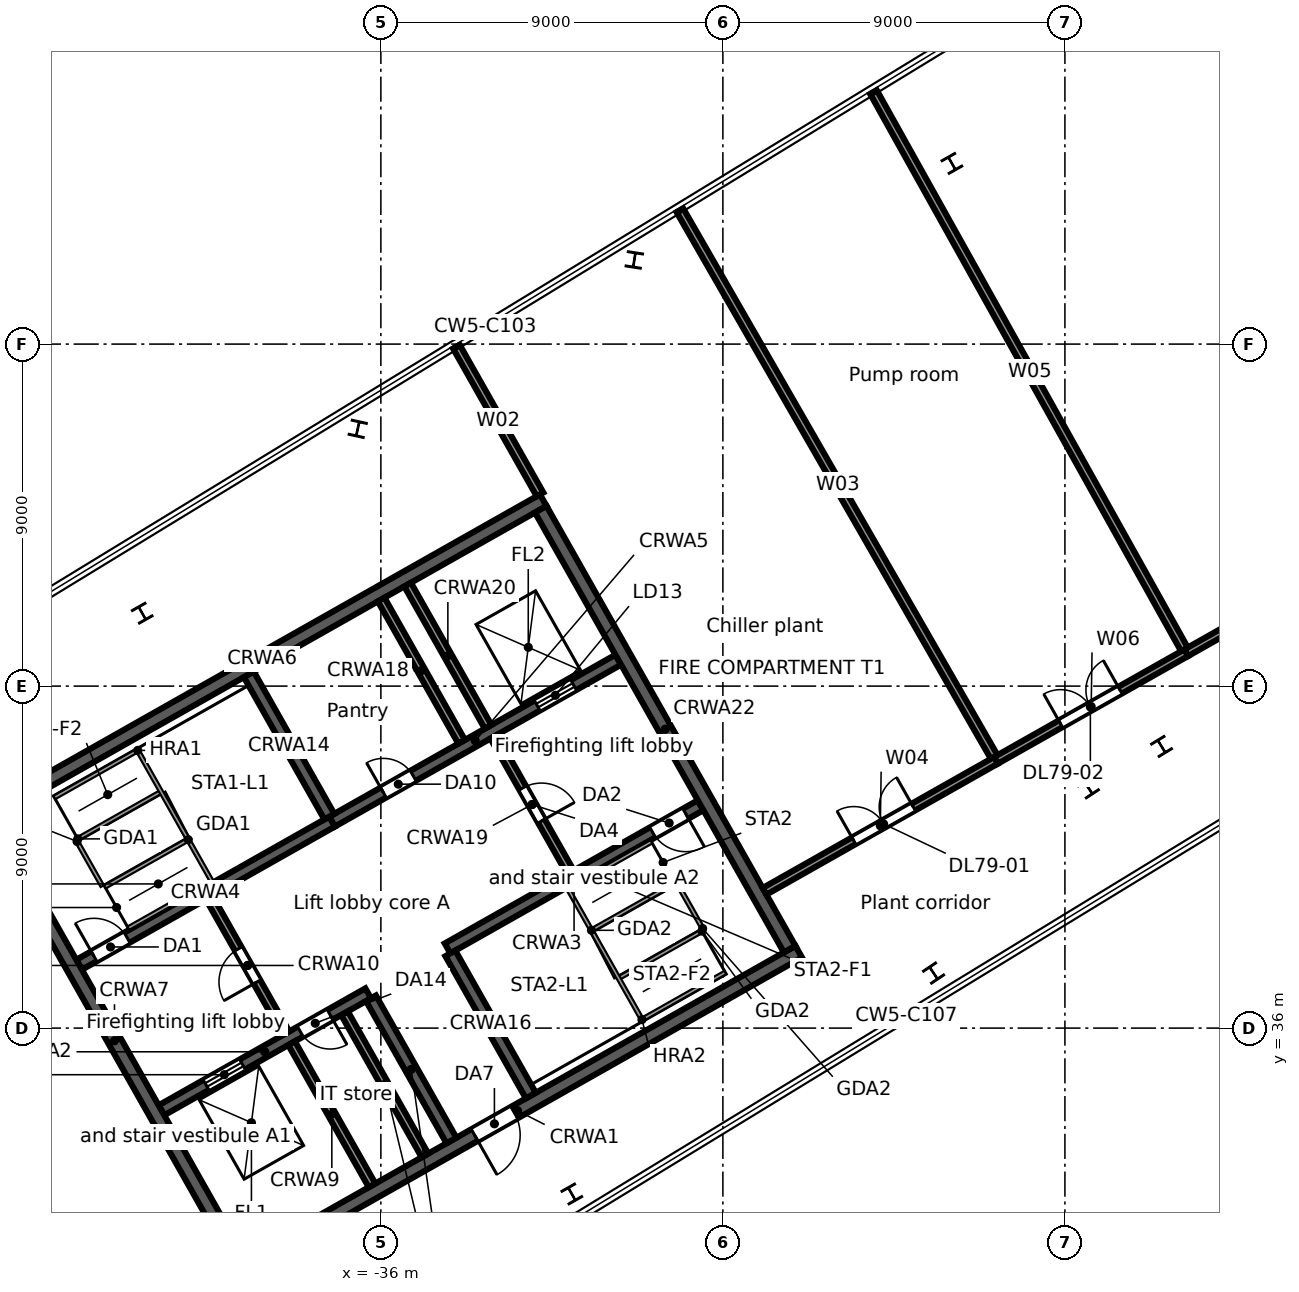
"""IFC4 building model, lengths in metres.
Left out: names, types, materials, properties, quantities, classifications, styles, units other than length and angle.
Written with IfcOpenShell. Run it as: python <this file> out.ifc"""

import sys

from ifc_helpers import new_model, si_unit, direction, frame, frame_2d, origin, origin_2d, place, context, subcontext, project, spatial, rectangle, i_section, extrude, element, fill, save


model = new_model("IFC4")
c1 = context("Model", 3, precision=1e-05, world=origin(), true_north=direction((0.0, 1.0)))
c2 = subcontext(c1, "Body", "Model", "MODEL_VIEW")
j1 = project(units=[si_unit("LENGTHUNIT", "METRE"), si_unit("PLANEANGLEUNIT", "RADIAN")], contexts=[c1])
p1 = place(None, origin())
s1 = spatial("IfcSite", under=j1, at=p1, CompositionType="ELEMENT")
p2 = place(p1, origin())
s2 = spatial("IfcBuilding", under=s1, at=p2, CompositionType="ELEMENT")
p3 = place(p2, frame((0.0, 0.0, 350.5)))
s3 = spatial("IfcBuildingStorey", under=s2, at=p3, CompositionType="ELEMENT", Elevation=350.5)
for number, where, z_axis, x_axis in (
    (1, (-42.28, 46.919, 0.0), (0.0, 0.0, 1.0), (-0.87, -0.492, 0.0)),
    (2, (-30.976, 31.635, 0.0), (0.0, 0.0, 1.0), (0.87, 0.492, 0.0)),
    (3, (-20.974, 58.755, 0.0), (0.0, 0.0, 1.0), (-0.87, -0.492, 0.0)),
    (4, (-29.331, 56.214, 0.0), (0.0, 0.0, 1.0), (-0.988, 0.153, 0.0)),
    (5, (-36.609, 51.77, 0.0), (0.0, 0.0, 1.0), (-0.977, 0.215, 0.0)),
    (6, (-21.456, 37.448, 0.0), (0.0, 0.0, 1.0), (0.83, 0.557, 0.0)),
    (7, (-15.458, 43.413, 0.0), (0.0, 0.0, 1.0), (0.853, 0.521, 0.0)),
):
    element("IfcColumn", number, at=place(p3, frame(where, z_axis=z_axis, x_axis=x_axis)), inside=s3, PredefinedType="COLUMN", context=c2, shape_type="SweptSolid", body=[
        extrude(i_section(OverallWidth=0.4, OverallDepth=0.4, WebThickness=0.013, FlangeThickness=0.021, FilletRadius=0.022, at=origin_2d()), origin(), (0.0, 0.0, 1.0), 3.3),
    ])
p4 = place(p3, frame((-17.382, 42.324, 0.0), z_axis=(0.0, 0.0, 1.0), x_axis=(0.835615665335, 0.549314536351, 0.0)))
e8 = element("IfcColumn", 8, at=p4, inside=s3, PredefinedType="COLUMN", context=c2, shape_type="SweptSolid", body=[
    extrude(i_section(OverallWidth=0.4, OverallDepth=0.4, WebThickness=0.013, FlangeThickness=0.021, FilletRadius=0.022, at=origin_2d()), origin(), (0.0, 0.0, 1.0), 3.6),
])
p5 = place(p3, frame((-44.12, 26.51, 0.0), z_axis=(0.0, 0.0, 1.0), x_axis=(-0.85716996621, 0.515033638734, 0.0)))
e9 = element("IfcWall", 9, at=p5, inside=s3, PredefinedType="STANDARD", context=c2, shape_type="SweptSolid", body=[
    extrude(rectangle(XDim=17.084, YDim=0.2, at=frame_2d((8.542, 0.0))), origin(), (0.0, 0.0, 1.0), 3.3),
])
p6 = place(p3, frame((-39.801, 29.64, 0.0), z_axis=(0.0, 0.0, 1.0), x_axis=(0.870359753402, 0.492416388494, 0.0)))
e10 = element("IfcWall", 10, at=p6, inside=s3, PredefinedType="SOLIDWALL", context=c2, shape_type="SweptSolid", body=[
    extrude(rectangle(XDim=17.0, YDim=0.35, at=frame_2d((8.5, 0.0))), origin(), (0.0, 0.0, 1.0), 3.3),
])
p7 = place(p6, frame((7.2, 0.0, 0.0)))
e11 = element("IfcOpeningElement", 11, at=p7, cuts=e10, PredefinedType="OPENING", context=c2, shape_type="SweptSolid", body=[
    extrude(rectangle(XDim=1.2, YDim=2.1, at=frame_2d((0.6, 1.05))), frame((0.0, 0.185, 0.0), z_axis=(0.0, -1.0, 0.0), x_axis=(1.0, 0.0, 0.0)), (0.0, 0.0, 1.0), 0.37),
])
p8 = place(p3, frame((-41.774, 33.838, 0.0), z_axis=(0.0, 0.0, 1.0), x_axis=(0.870355415866, 0.492424055132, 0.0)))
e12 = element("IfcWall", 12, at=p8, inside=s3, PredefinedType="SOLIDWALL", context=c2, shape_type="SweptSolid", body=[
    extrude(rectangle(XDim=6.25, YDim=0.3, at=frame_2d((3.125, 0.0))), origin(), (0.0, 0.0, 1.0), 3.3),
])
p9 = place(p8, frame((1.35, 0.0, 0.0)))
e13 = element("IfcOpeningElement", 13, at=p9, cuts=e12, PredefinedType="OPENING", context=c2, shape_type="SweptSolid", body=[
    extrude(rectangle(XDim=1.1, YDim=2.1, at=frame_2d((0.55, 1.05))), frame((0.0, 0.16, 0.0), z_axis=(0.0, -1.0, 0.0), x_axis=(1.0, 0.0, 0.0)), (0.0, 0.0, 1.0), 0.32),
])
p10 = place(p8, frame((4.2, 0.0, 0.0)))
e14 = element("IfcOpeningElement", 14, at=p10, cuts=e12, PredefinedType="OPENING", context=c2, shape_type="SweptSolid", body=[
    extrude(rectangle(XDim=0.9, YDim=2.1, at=frame_2d((0.45, 1.05))), frame((0.0, 0.16, 0.0), z_axis=(0.0, -1.0, 0.0), x_axis=(1.0, 0.0, 0.0)), (0.0, 0.0, 1.0), 0.32),
])
p11 = place(p3, frame((-34.245, 38.097, 0.0), z_axis=(0.0, 0.0, 1.0), x_axis=(0.870352347706, 0.49242947804, 0.0)))
e15 = element("IfcWall", 15, at=p11, inside=s3, PredefinedType="SOLIDWALL", context=c2, shape_type="SweptSolid", body=[
    extrude(rectangle(XDim=7.65, YDim=0.3, at=frame_2d((3.825, 0.0))), origin(), (0.0, 0.0, 1.0), 3.3),
])
p12 = place(p11, frame((6.2, 0.0, 0.0)))
e16 = element("IfcOpeningElement", 16, at=p12, cuts=e15, PredefinedType="OPENING", context=c2, shape_type="SweptSolid", body=[
    extrude(rectangle(XDim=1.0, YDim=2.1, at=frame_2d((0.5, 1.05))), frame((0.0, 0.16, 0.0), z_axis=(0.0, -1.0, 0.0), x_axis=(1.0, 0.0, 0.0)), (0.0, 0.0, 1.0), 0.32),
])
p13 = place(p3, frame((-43.94, 37.667, 0.0), z_axis=(0.0, 0.0, 1.0), x_axis=(0.870352347706, 0.49242947804, 0.0)))
e17 = element("IfcWall", 17, at=p13, inside=s3, PredefinedType="SOLIDWALL", context=c2, shape_type="SweptSolid", body=[
    extrude(rectangle(XDim=7.65, YDim=0.3, at=frame_2d((3.825, 0.0))), origin(), (0.0, 0.0, 1.0), 3.3),
])
p14 = place(p13, frame((0.45, 0.0, 0.0)))
e18 = element("IfcOpeningElement", 18, at=p14, cuts=e17, PredefinedType="OPENING", context=c2, shape_type="SweptSolid", body=[
    extrude(rectangle(XDim=1.0, YDim=2.1, at=frame_2d((0.5, 1.05))), frame((0.0, 0.16, 0.0), z_axis=(0.0, -1.0, 0.0), x_axis=(1.0, 0.0, 0.0)), (0.0, 0.0, 1.0), 0.32),
])
p15 = place(p3, frame((-37.282, 41.435, 0.0), z_axis=(0.0, 0.0, 1.0), x_axis=(0.870364588774, 0.492407841741, 0.0)))
e19 = element("IfcWall", 19, at=p15, inside=s3, PredefinedType="SOLIDWALL", context=c2, shape_type="SweptSolid", body=[
    extrude(rectangle(XDim=8.65, YDim=0.3, at=frame_2d((4.325, 0.0))), origin(), (0.0, 0.0, 1.0), 3.3),
])
p16 = place(p15, frame((6.2, 0.0, 0.0)))
e20 = element("IfcOpeningElement", 20, at=p16, cuts=e19, PredefinedType="OPENING", context=c2, shape_type="SweptSolid", body=[
    extrude(rectangle(XDim=1.1, YDim=2.1, at=frame_2d((0.55, 1.05))), frame((0.0, 0.16, 0.0), z_axis=(0.0, -1.0, 0.0), x_axis=(1.0, 0.0, 0.0)), (0.0, 0.0, 1.0), 0.32),
])
p17 = place(p15, frame((1.55, 0.0, 0.0)))
e21 = element("IfcOpeningElement", 21, at=p17, cuts=e19, PredefinedType="OPENING", context=c2, shape_type="SweptSolid", body=[
    extrude(rectangle(XDim=0.9, YDim=2.1, at=frame_2d((0.45, 1.05))), frame((0.0, 0.16, 0.0), z_axis=(0.0, -1.0, 0.0), x_axis=(1.0, 0.0, 0.0)), (0.0, 0.0, 1.0), 0.32),
])
p18 = place(p3, frame((-46.522, 41.521, 0.0), z_axis=(0.0, 0.0, 1.0), x_axis=(0.870359753402, 0.492416388494, 0.0)))
e22 = element("IfcWall", 22, at=p18, inside=s3, PredefinedType="SOLIDWALL", context=c2, shape_type="SweptSolid", body=[
    extrude(rectangle(XDim=17.0, YDim=0.35, at=frame_2d((8.5, 0.0))), origin(), (0.0, 0.0, 1.0), 3.3),
])
p19 = place(p3, frame((-46.284, 41.454, 0.0), z_axis=(0.0, 0.0, 1.0), x_axis=(0.492429810477, -0.870352159619, 0.0)))
e23 = element("IfcWall", 23, at=p19, inside=s3, PredefinedType="SOLIDWALL", context=c2, shape_type="SweptSolid", body=[
    extrude(rectangle(XDim=13.3, YDim=0.35, at=frame_2d((6.65, 0.0))), origin(), (0.0, 0.0, 1.0), 3.3),
])
p20 = place(p3, frame((-38.349, 35.603, 0.0), z_axis=(0.0, 0.0, 1.0), x_axis=(0.492410799949, -0.870362915164, 0.0)))
e24 = element("IfcWall", 24, at=p20, inside=s3, PredefinedType="SOLIDWALL", context=c2, shape_type="SweptSolid", body=[
    extrude(rectangle(XDim=4.3, YDim=0.2, at=frame_2d((2.15, 0.0))), origin(), (0.0, 0.0, 1.0), 3.3),
])
p21 = place(p3, frame((-40.516, 39.433, 0.0), z_axis=(0.0, 0.0, 1.0), x_axis=(0.492453559952, -0.87033872216, 0.0)))
e25 = element("IfcWall", 25, at=p21, inside=s3, PredefinedType="PARTITIONING", context=c2, shape_type="SweptSolid", body=[
    extrude(rectangle(XDim=4.1, YDim=0.2, at=frame_2d((2.05, 0.0))), origin(), (0.0, 0.0, 1.0), 3.3),
])
p22 = place(p21, frame((1.55, 0.0, 0.0)))
e26 = element("IfcOpeningElement", 26, at=p22, cuts=e25, PredefinedType="OPENING", context=c2, shape_type="SweptSolid", body=[
    extrude(rectangle(XDim=1.0, YDim=2.1, at=frame_2d((0.5, 1.05))), frame((0.0, 0.11, 0.0), z_axis=(0.0, -1.0, 0.0), x_axis=(1.0, 0.0, 0.0)), (0.0, 0.0, 1.0), 0.22),
])
p23 = place(p3, frame((-36.956, 36.391, 0.0), z_axis=(0.0, 0.0, 1.0), x_axis=(0.492410799949, -0.870362915164, 0.0)))
e27 = element("IfcWall", 27, at=p23, inside=s3, PredefinedType="SOLIDWALL", context=c2, shape_type="SweptSolid", body=[
    extrude(rectangle(XDim=4.3, YDim=0.2, at=frame_2d((2.15, 0.0))), origin(), (0.0, 0.0, 1.0), 3.3),
])
p24 = place(p3, frame((-36.26, 36.785, 0.0), z_axis=(0.0, 0.0, 1.0), x_axis=(0.492435133428, -0.870349147967, 0.0)))
e28 = element("IfcWall", 28, at=p24, inside=s3, PredefinedType="SOLIDWALL", context=c2, shape_type="SweptSolid", body=[
    extrude(rectangle(XDim=4.3, YDim=0.3, at=frame_2d((2.15, 0.0))), origin(), (0.0, 0.0, 1.0), 3.3),
])
p25 = place(p3, frame((-39.473, 45.308, 0.0), z_axis=(0.0, 0.0, 1.0), x_axis=(0.492410799949, -0.870362915164, 0.0)))
e29 = element("IfcWall", 29, at=p25, inside=s3, PredefinedType="SOLIDWALL", context=c2, shape_type="SweptSolid", body=[
    extrude(rectangle(XDim=4.3, YDim=0.3, at=frame_2d((2.15, 0.0))), origin(), (0.0, 0.0, 1.0), 3.3),
])
p26 = place(p3, frame((-34.171, 37.967, 0.0), z_axis=(0.0, 0.0, 1.0), x_axis=(0.492435133428, -0.870349147967, 0.0)))
e30 = element("IfcWall", 30, at=p26, inside=s3, PredefinedType="SOLIDWALL", context=c2, shape_type="SweptSolid", body=[
    extrude(rectangle(XDim=4.3, YDim=0.3, at=frame_2d((2.15, 0.0))), origin(), (0.0, 0.0, 1.0), 3.3),
])
p27 = place(p3, frame((-35.992, 47.277, 0.0), z_axis=(0.0, 0.0, 1.0), x_axis=(0.492410799949, -0.870362915164, 0.0)))
e31 = element("IfcWall", 31, at=p27, inside=s3, PredefinedType="SOLIDWALL", context=c2, shape_type="SweptSolid", body=[
    extrude(rectangle(XDim=4.3, YDim=0.2, at=frame_2d((2.15, 0.0))), origin(), (0.0, 0.0, 1.0), 3.3),
])
p28 = place(p3, frame((-33.031, 43.667, 0.0), z_axis=(0.0, 0.0, 1.0), x_axis=(0.492408451753, -0.87036424366, 0.0)))
e32 = element("IfcWall", 32, at=p28, inside=s3, PredefinedType="PARTITIONING", context=c2, shape_type="SweptSolid", body=[
    extrude(rectangle(XDim=4.1, YDim=0.2, at=frame_2d((2.05, 0.0))), origin(), (0.0, 0.0, 1.0), 3.3),
])
p29 = place(p28, frame((1.55, 0.0, 0.0)))
e33 = element("IfcOpeningElement", 33, at=p29, cuts=e32, PredefinedType="OPENING", context=c2, shape_type="SweptSolid", body=[
    extrude(rectangle(XDim=1.0, YDim=2.1, at=frame_2d((0.5, 1.05))), frame((0.0, 0.11, 0.0), z_axis=(0.0, -1.0, 0.0), x_axis=(1.0, 0.0, 0.0)), (0.0, 0.0, 1.0), 0.22),
])
p30 = place(p3, frame((-35.296, 47.671, 0.0), z_axis=(0.0, 0.0, 1.0), x_axis=(0.492435133428, -0.870349147967, 0.0)))
e34 = element("IfcWall", 34, at=p30, inside=s3, PredefinedType="SOLIDWALL", context=c2, shape_type="SweptSolid", body=[
    extrude(rectangle(XDim=4.3, YDim=0.2, at=frame_2d((2.15, 0.0))), origin(), (0.0, 0.0, 1.0), 3.3),
])
p31 = place(p3, frame((-31.792, 49.653, 0.0), z_axis=(0.0, 0.0, 1.0), x_axis=(0.492421943245, -0.870356610712, 0.0)))
e35 = element("IfcWall", 35, at=p31, inside=s3, PredefinedType="SOLIDWALL", context=c2, shape_type="SweptSolid", body=[
    extrude(rectangle(XDim=13.3, YDim=0.35, at=frame_2d((6.65, 0.0))), origin(), (0.0, 0.0, 1.0), 3.3),
])
p32 = place(p3, frame((-34.012, 53.93, 0.0), z_axis=(0.0, 0.0, 1.0), x_axis=(0.49265524993, -0.870224571428, 0.0)))
e36 = element("IfcWall", 36, at=p32, inside=s3, PredefinedType="PARTITIONING", context=c2, shape_type="SweptSolid", body=[
    extrude(rectangle(XDim=4.466, YDim=0.2, at=frame_2d((2.233, 0.0))), origin(), (0.0, 0.0, 1.0), 2.18),
])
p33 = place(p3, frame((-28.131, 57.521, 0.0), z_axis=(0.0, 0.0, 1.0), x_axis=(0.498362592797, -0.866968699609, 0.0)))
e37 = element("IfcWall", 37, at=p33, inside=s3, PredefinedType="PARTITIONING", context=c2, shape_type="SweptSolid", body=[
    extrude(rectangle(XDim=16.695, YDim=0.2, at=frame_2d((8.347, 0.0))), origin(), (0.0, 0.0, 1.0), 2.68),
])
p34 = place(p3, frame((-25.904, 39.6, 0.0), z_axis=(0.0, 0.0, 1.0), x_axis=(0.870370511163, 0.492397373366, 0.0)))
e38 = element("IfcWall", 38, at=p34, inside=s3, PredefinedType="PARTITIONING", context=c2, shape_type="SweptSolid", body=[
    extrude(rectangle(XDim=7.0, YDim=0.2, at=frame_2d((3.5, 0.0))), origin(), (0.0, 0.0, 1.0), 3.3),
])
p35 = place(p34, frame((2.7, 0.0, 0.0)))
e39 = element("IfcOpeningElement", 39, at=p35, cuts=e38, PredefinedType="OPENING", context=c2, shape_type="SweptSolid", body=[
    extrude(rectangle(XDim=1.8, YDim=2.1, at=frame_2d((0.9, 1.05))), frame((0.0, 0.11, 0.0), z_axis=(0.0, -1.0, 0.0), x_axis=(1.0, 0.0, 0.0)), (0.0, 0.0, 1.0), 0.22),
])
p36 = place(p3, frame((-23.037, 60.631, 0.0), z_axis=(0.0, 0.0, 1.0), x_axis=(0.487224959402, -0.873276496269, 0.0)))
e40 = element("IfcWall", 40, at=p36, inside=s3, PredefinedType="PARTITIONING", context=c2, shape_type="SweptSolid", body=[
    extrude(rectangle(XDim=16.894, YDim=0.2, at=frame_2d((8.447, 0.0))), origin(), (0.0, 0.0, 1.0), 2.68),
])
p37 = place(p3, frame((-19.811, 43.047, 0.0), z_axis=(0.0, 0.0, 1.0), x_axis=(0.870426794604, 0.492297872467, 0.0)))
e41 = element("IfcWall", 41, at=p37, inside=s3, PredefinedType="PARTITIONING", context=c2, shape_type="SweptSolid", body=[
    extrude(rectangle(XDim=5.75, YDim=0.2, at=frame_2d((2.875, 0.0))), origin(), (0.0, 0.0, 1.0), 3.3),
])
p38 = place(p37, frame((1.95, 0.0, 0.0)))
e42 = element("IfcOpeningElement", 42, at=p38, cuts=e41, PredefinedType="OPENING", context=c2, shape_type="SweptSolid", body=[
    extrude(rectangle(XDim=1.8, YDim=2.1, at=frame_2d((0.9, 1.05))), frame((0.0, 0.11, 0.0), z_axis=(0.0, -1.0, 0.0), x_axis=(1.0, 0.0, 0.0)), (0.0, 0.0, 1.0), 0.22),
])
p39 = place(p3, frame((-14.806, 45.878, 0.0), z_axis=(0.0, 0.0, 1.0), x_axis=(0.870379652776, 0.492381214136, 0.0)))
e43 = element("IfcWall", 43, at=p39, inside=s3, PredefinedType="PARTITIONING", context=c2, shape_type="SweptSolid", body=[
    extrude(rectangle(XDim=12.862, YDim=0.2, at=frame_2d((6.431, 0.0))), origin(), (0.0, 0.0, 1.0), 2.68),
])
p40 = place(p39, frame((5.45, 0.0, 0.0)))
e44 = element("IfcOpeningElement", 44, at=p40, cuts=e43, PredefinedType="OPENING", context=c2, shape_type="SweptSolid", body=[
    extrude(rectangle(XDim=1.8, YDim=2.1, at=frame_2d((0.9, 1.05))), frame((0.0, 0.11, 0.0), z_axis=(0.0, -1.0, 0.0), x_axis=(1.0, 0.0, 0.0)), (0.0, 0.0, 1.0), 0.22),
])
p41 = place(p16, origin())
e45 = element("IfcDoor", 45, at=p41, inside=s3, OperationType="DOUBLE_DOOR_SLIDING", PredefinedType="DOOR", context=c2, shape_type="SweptSolid", body=[
    extrude(rectangle(XDim=1.1, YDim=2.1, at=frame_2d((0.55, 1.05))), frame((0.0, 0.025, 0.0), z_axis=(0.0, -1.0, 0.0), x_axis=(1.0, 0.0, 0.0)), (0.0, 0.0, 1.0), 0.05),
])
fill(e20, e45)
p42 = place(p9, origin())
e46 = element("IfcDoor", 46, at=p42, inside=s3, OperationType="DOUBLE_DOOR_SLIDING", PredefinedType="DOOR", context=c2, shape_type="SweptSolid", body=[
    extrude(rectangle(XDim=1.1, YDim=2.1, at=frame_2d((0.55, 1.05))), frame((0.0, 0.025, 0.0), z_axis=(0.0, -1.0, 0.0), x_axis=(1.0, 0.0, 0.0)), (0.0, 0.0, 1.0), 0.05),
])
fill(e13, e46)
p43 = place(p14, origin())
e47 = element("IfcDoor", 47, at=p43, inside=s3, OperationType="SINGLE_SWING_LEFT", PredefinedType="DOOR", context=c2, shape_type="SweptSolid", body=[
    extrude(rectangle(XDim=1.0, YDim=2.1, at=frame_2d((0.5, 1.05))), frame((0.0, 0.025, 0.0), z_axis=(0.0, -1.0, 0.0), x_axis=(1.0, 0.0, 0.0)), (0.0, 0.0, 1.0), 0.05),
])
fill(e18, e47)
p44 = place(p12, frame((1.0, 0.0, 0.0), z_axis=(0.0, 0.0, 1.0), x_axis=(-1.0, 0.0, 0.0)))
e48 = element("IfcDoor", 48, at=p44, inside=s3, OperationType="SINGLE_SWING_LEFT", PredefinedType="DOOR", context=c2, shape_type="SweptSolid", body=[
    extrude(rectangle(XDim=1.0, YDim=2.1, at=frame_2d((0.5, 1.05))), frame((0.0, 0.025, 0.0), z_axis=(0.0, -1.0, 0.0), x_axis=(1.0, 0.0, 0.0)), (0.0, 0.0, 1.0), 0.05),
])
fill(e16, e48)
p45 = place(p22, frame((1.0, 0.0, 0.0), z_axis=(0.0, 0.0, 1.0), x_axis=(-1.0, 0.0, 0.0)))
e49 = element("IfcDoor", 49, at=p45, inside=s3, OperationType="SINGLE_SWING_LEFT", PredefinedType="DOOR", context=c2, shape_type="SweptSolid", body=[
    extrude(rectangle(XDim=1.0, YDim=2.1, at=frame_2d((0.5, 1.05))), frame((0.0, 0.025, 0.0), z_axis=(0.0, -1.0, 0.0), x_axis=(1.0, 0.0, 0.0)), (0.0, 0.0, 1.0), 0.05),
])
fill(e26, e49)
p46 = place(p29, origin())
e50 = element("IfcDoor", 50, at=p46, inside=s3, OperationType="SINGLE_SWING_RIGHT", PredefinedType="DOOR", context=c2, shape_type="SweptSolid", body=[
    extrude(rectangle(XDim=1.0, YDim=2.1, at=frame_2d((0.5, 1.05))), frame((0.0, 0.025, 0.0), z_axis=(0.0, -1.0, 0.0), x_axis=(1.0, 0.0, 0.0)), (0.0, 0.0, 1.0), 0.05),
])
fill(e33, e50)
p47 = place(p7, frame((1.2, 0.0, 0.0), z_axis=(0.0, 0.0, 1.0), x_axis=(-1.0, 0.0, 0.0)))
e51 = element("IfcDoor", 51, at=p47, inside=s3, OperationType="SINGLE_SWING_RIGHT", PredefinedType="DOOR", context=c2, shape_type="SweptSolid", body=[
    extrude(rectangle(XDim=1.2, YDim=2.1, at=frame_2d((0.6, 1.05))), frame((0.0, 0.025, 0.0), z_axis=(0.0, -1.0, 0.0), x_axis=(1.0, 0.0, 0.0)), (0.0, 0.0, 1.0), 0.05),
])
fill(e11, e51)
p48 = place(p17, origin())
e52 = element("IfcDoor", 52, at=p48, inside=s3, OperationType="SINGLE_SWING_LEFT", PredefinedType="DOOR", context=c2, shape_type="SweptSolid", body=[
    extrude(rectangle(XDim=0.9, YDim=2.1, at=frame_2d((0.45, 1.05))), frame((0.0, 0.025, 0.0), z_axis=(0.0, -1.0, 0.0), x_axis=(1.0, 0.0, 0.0)), (0.0, 0.0, 1.0), 0.05),
])
fill(e21, e52)
p49 = place(p10, frame((0.9, 0.0, 0.0), z_axis=(0.0, 0.0, 1.0), x_axis=(-1.0, 0.0, 0.0)))
e53 = element("IfcDoor", 53, at=p49, inside=s3, OperationType="SINGLE_SWING_LEFT", PredefinedType="DOOR", context=c2, shape_type="SweptSolid", body=[
    extrude(rectangle(XDim=0.9, YDim=2.1, at=frame_2d((0.45, 1.05))), frame((0.0, 0.025, 0.0), z_axis=(0.0, -1.0, 0.0), x_axis=(1.0, 0.0, 0.0)), (0.0, 0.0, 1.0), 0.05),
])
fill(e14, e53)
p50 = place(p35, origin())
e54 = element("IfcDoor", 54, at=p50, inside=s3, OperationType="DOUBLE_DOOR_SINGLE_SWING", PredefinedType="DOOR", context=c2, shape_type="SweptSolid", body=[
    extrude(rectangle(XDim=1.8, YDim=2.1, at=frame_2d((0.9, 1.05))), frame((0.0, 0.025, 0.0), z_axis=(0.0, -1.0, 0.0), x_axis=(1.0, 0.0, 0.0)), (0.0, 0.0, 1.0), 0.05),
])
fill(e39, e54)
p51 = place(p38, origin())
e55 = element("IfcDoor", 55, at=p51, inside=s3, OperationType="DOUBLE_DOOR_SINGLE_SWING", PredefinedType="DOOR", context=c2, shape_type="SweptSolid", body=[
    extrude(rectangle(XDim=1.8, YDim=2.1, at=frame_2d((0.9, 1.05))), frame((0.0, 0.025, 0.0), z_axis=(0.0, -1.0, 0.0), x_axis=(1.0, 0.0, 0.0)), (0.0, 0.0, 1.0), 0.05),
])
fill(e42, e55)
save(model, sys.argv[1])
